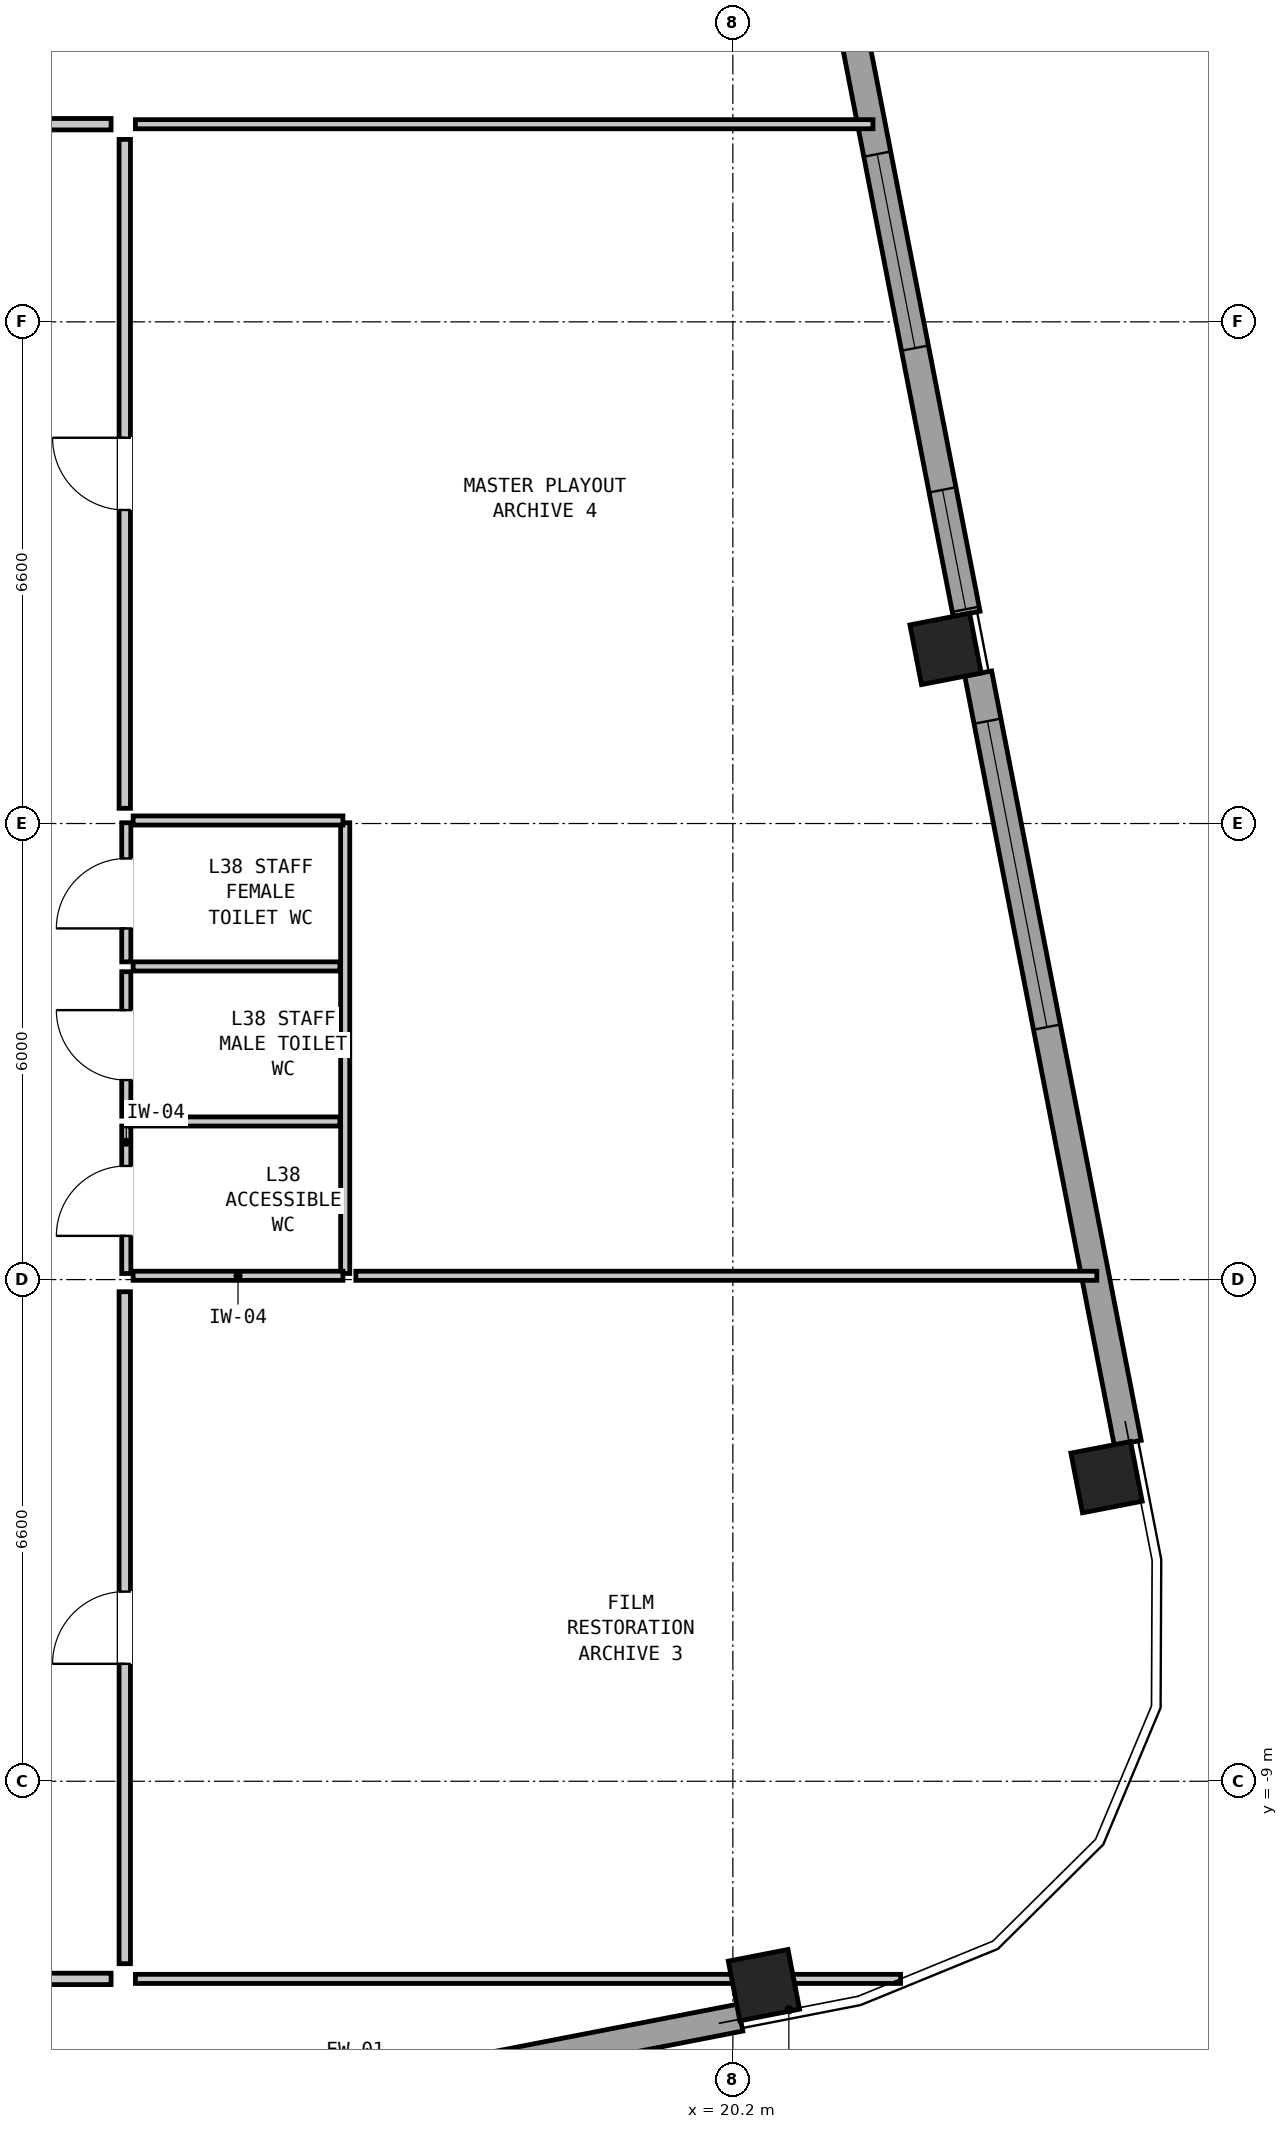
"""IFC4 building model, lengths in metres.
Left out: names, types, materials, properties, quantities, classifications, styles, units other than length and angle.
Written with IfcOpenShell. Run it as: python <this file> out.ifc"""

import sys

from ifc_helpers import new_model, si_unit, direction, frame, frame_2d, origin, origin_2d, place, context, subcontext, project, spatial, rectangle, hollow_rectangle, extrude, element, fill, save


model = new_model("IFC4")
c1 = context("Model", 3, precision=1e-05, world=origin(), true_north=direction((0.0, 1.0)))
c2 = subcontext(c1, "Body", "Model", "MODEL_VIEW")
j1 = project(units=[si_unit("LENGTHUNIT", "METRE"), si_unit("PLANEANGLEUNIT", "RADIAN")], contexts=[c1])
p1 = place(None, origin())
s1 = spatial("IfcSite", under=j1, at=p1, CompositionType="ELEMENT")
p2 = place(p1, origin())
s2 = spatial("IfcBuilding", under=s1, at=p2, CompositionType="ELEMENT")
p3 = place(p2, frame((0.0, 0.0, 131.1)))
s3 = spatial("IfcBuildingStorey", under=s2, at=p3, CompositionType="ELEMENT", Elevation=131.1)
for number, where, z_axis, x_axis in (
    (1, (20.609, -11.682, 0.0), (0.0, 0.0, 1.0), (0.982, 0.191, 0.0)),
    (2, (25.116, -5.0, 0.0), (0.0, 0.0, 1.0), (-0.191, 0.982, 0.0)),
    (3, (22.998, 5.896, 0.0), (0.0, 0.0, 1.0), (-0.191, 0.982, 0.0)),
):
    element("IfcColumn", number, at=place(p3, frame(where, z_axis=z_axis, x_axis=x_axis)), inside=s3, PredefinedType="COLUMN", context=c2, shape_type="SweptSolid", body=[
        extrude(hollow_rectangle(XDim=0.8, YDim=0.8, WallThickness=0.05, at=origin_2d()), origin(), (0.0, 0.0, 1.0), 3.05),
    ])
p4 = place(p3, frame((20.296, -12.11, 0.0), z_axis=(0.0, 0.0, 1.0), x_axis=(-0.981628941133, -0.190799952646, 0.0)))
e4 = element("IfcWall", 4, at=p4, inside=s3, PredefinedType="SOLIDWALL", context=c2, shape_type="SweptSolid", body=[
    extrude(rectangle(XDim=10.312, YDim=0.36, at=frame_2d((5.156, 0.0))), origin(), (0.0, 0.0, 1.0), 2.067),
])
p5 = place(p4, frame((5.8, 0.0, 0.2)))
e5 = element("IfcOpeningElement", 5, at=p5, cuts=e4, PredefinedType="OPENING", context=c2, shape_type="SweptSolid", body=[
    extrude(rectangle(XDim=3.7, YDim=1.1, at=frame_2d((1.85, 0.55))), frame((0.0, 0.192, 0.0), z_axis=(0.0, -1.0, 0.0), x_axis=(1.0, 0.0, 0.0)), (0.0, 0.0, 1.0), 0.384),
])
p6 = place(p3, frame((21.31, 16.469, 0.0), z_axis=(0.0, 0.0, 1.0), x_axis=(0.190811924826, -0.981626614016, 0.0)))
e6 = element("IfcWall", 6, at=p6, inside=s3, PredefinedType="SOLIDWALL", context=c2, shape_type="SweptSolid", body=[
    extrude(rectangle(XDim=10.3, YDim=0.36, at=frame_2d((5.15, 0.0))), origin(), (0.0, 0.0, 1.0), 2.067),
])
p7 = place(p6, frame((0.038, 0.0, 1.15)))
e7 = element("IfcOpeningElement", 7, at=p7, cuts=e6, PredefinedType="OPENING", context=c2, shape_type="SweptSolid", body=[
    extrude(rectangle(XDim=1.65, YDim=0.75, at=frame_2d((0.825, 0.375))), frame((0.0, 0.192, 0.0), z_axis=(0.0, -1.0, 0.0), x_axis=(1.0, 0.0, 0.0)), (0.0, 0.0, 1.0), 0.384),
])
p8 = place(p6, frame((4.138, 0.0, 0.2)))
e8 = element("IfcOpeningElement", 8, at=p8, cuts=e6, PredefinedType="OPENING", context=c2, shape_type="SweptSolid", body=[
    extrude(rectangle(XDim=2.6, YDim=1.3, at=frame_2d((1.3, 0.65))), frame((0.0, 0.192, 0.0), z_axis=(0.0, -1.0, 0.0), x_axis=(1.0, 0.0, 0.0)), (0.0, 0.0, 1.0), 0.384),
])
p9 = place(p6, frame((8.638, 0.0, 1.15)))
e9 = element("IfcOpeningElement", 9, at=p9, cuts=e6, PredefinedType="OPENING", context=c2, shape_type="SweptSolid", body=[
    extrude(rectangle(XDim=1.6, YDim=0.75, at=frame_2d((0.8, 0.375))), frame((0.0, 0.192, 0.0), z_axis=(0.0, -1.0, 0.0), x_axis=(1.0, 0.0, 0.0)), (0.0, 0.0, 1.0), 0.384),
])
p10 = place(p3, frame((23.428, 5.573, 0.0), z_axis=(0.0, 0.0, 1.0), x_axis=(0.190827200853, -0.981623644486, 0.0)))
e10 = element("IfcWall", 10, at=p10, inside=s3, PredefinedType="SOLIDWALL", context=c2, shape_type="SweptSolid", body=[
    extrude(rectangle(XDim=10.312, YDim=0.36, at=frame_2d((5.156, 0.0))), origin(), (0.0, 0.0, 1.0), 2.067),
])
p11 = place(p10, frame((0.638, 0.0, 0.2)))
e11 = element("IfcOpeningElement", 11, at=p11, cuts=e10, PredefinedType="OPENING", context=c2, shape_type="SweptSolid", body=[
    extrude(rectangle(XDim=4.1, YDim=1.05, at=frame_2d((2.05, 0.525))), frame((0.0, 0.192, 0.0), z_axis=(0.0, -1.0, 0.0), x_axis=(1.0, 0.0, 0.0)), (0.0, 0.0, 1.0), 0.384),
])
p12 = place(p3, frame((12.22, -2.32, 0.0), z_axis=(0.0, 0.0, 1.0), x_axis=(0.0, 1.0, 0.0)))
e12 = element("IfcWall", 12, at=p12, inside=s3, PredefinedType="PARTITIONING", context=c2, shape_type="SweptSolid", body=[
    extrude(rectangle(XDim=1.94, YDim=0.12, at=frame_2d((0.97, 0.0))), origin(), (0.0, 0.0, 1.0), 2.83),
])
p13 = place(p12, frame((0.495, 0.0, 0.0)))
e13 = element("IfcOpeningElement", 13, at=p13, cuts=e12, PredefinedType="OPENING", context=c2, shape_type="SweptSolid", body=[
    extrude(rectangle(XDim=0.92, YDim=2.1, at=frame_2d((0.46, 1.05))), frame((0.0, 0.072, 0.0), z_axis=(0.0, -1.0, 0.0), x_axis=(1.0, 0.0, 0.0)), (0.0, 0.0, 1.0), 0.144),
])
p14 = place(p3, frame((12.22, -0.25, 0.0), z_axis=(0.0, 0.0, 1.0), x_axis=(0.0, 1.0, 0.0)))
e14 = element("IfcWall", 14, at=p14, inside=s3, PredefinedType="PARTITIONING", context=c2, shape_type="SweptSolid", body=[
    extrude(rectangle(XDim=1.9, YDim=0.12, at=frame_2d((0.95, 0.0))), origin(), (0.0, 0.0, 1.0), 2.83),
])
p15 = place(p14, frame((0.475, 0.0, 0.0)))
e15 = element("IfcOpeningElement", 15, at=p15, cuts=e14, PredefinedType="OPENING", context=c2, shape_type="SweptSolid", body=[
    extrude(rectangle(XDim=0.92, YDim=2.1, at=frame_2d((0.46, 1.05))), frame((0.0, 0.072, 0.0), z_axis=(0.0, -1.0, 0.0), x_axis=(1.0, 0.0, 0.0)), (0.0, 0.0, 1.0), 0.144),
])
p16 = place(p3, frame((12.22, 1.78, 0.0), z_axis=(0.0, 0.0, 1.0), x_axis=(0.0, 1.0, 0.0)))
e16 = element("IfcWall", 16, at=p16, inside=s3, PredefinedType="PARTITIONING", context=c2, shape_type="SweptSolid", body=[
    extrude(rectangle(XDim=1.83, YDim=0.12, at=frame_2d((0.915, 0.0))), origin(), (0.0, 0.0, 1.0), 2.83),
])
p17 = place(p16, frame((0.44, 0.0, 0.0)))
e17 = element("IfcOpeningElement", 17, at=p17, cuts=e16, PredefinedType="OPENING", context=c2, shape_type="SweptSolid", body=[
    extrude(rectangle(XDim=0.92, YDim=2.1, at=frame_2d((0.46, 1.05))), frame((0.0, 0.072, 0.0), z_axis=(0.0, -1.0, 0.0), x_axis=(1.0, 0.0, 0.0)), (0.0, 0.0, 1.0), 0.144),
])
p18 = place(p3, frame((15.1, -2.32, 0.0), z_axis=(0.0, 0.0, 1.0), x_axis=(0.0, 1.0, 0.0)))
e18 = element("IfcWall", 18, at=p18, inside=s3, PredefinedType="PARTITIONING", context=c2, shape_type="SweptSolid", body=[
    extrude(rectangle(XDim=5.93, YDim=0.12, at=frame_2d((2.965, 0.0))), origin(), (0.0, 0.0, 1.0), 2.83),
])
for number, where, z_axis, x_axis in (
    (19, (12.31, -2.35, 0.0), (0.0, 0.0, 1.0), (1.0, 0.0, 0.0)),
    (20, (12.31, 3.64, 0.0), (0.0, 0.0, 1.0), (1.0, 0.0, 0.0)),
):
    element("IfcWall", number, at=place(p3, frame(where, z_axis=z_axis, x_axis=x_axis)), inside=s3, PredefinedType="PARTITIONING", context=c2, shape_type="SweptSolid", body=[
        extrude(rectangle(XDim=2.76, YDim=0.12, at=frame_2d((1.38, 0.0))), origin(), (0.0, 0.0, 1.0), 1.883),
    ])
for number, where, z_axis, x_axis in (
    (21, (12.31, -0.32, 0.0), (0.0, 0.0, 1.0), (1.0, 0.0, 0.0)),
    (22, (12.31, 1.72, 0.0), (0.0, 0.0, 1.0), (1.0, 0.0, 0.0)),
):
    element("IfcWall", number, at=place(p3, frame(where, z_axis=z_axis, x_axis=x_axis)), inside=s3, PredefinedType="PARTITIONING", context=c2, shape_type="SweptSolid", body=[
        extrude(rectangle(XDim=2.72, YDim=0.12, at=frame_2d((1.36, 0.0))), origin(), (0.0, 0.0, 1.0), 2.83),
    ])
p19 = place(p3, frame((12.34, 12.8, 0.0), z_axis=(0.0, 0.0, 1.0), x_axis=(1.0, 0.0, 0.0)))
e23 = element("IfcWall", 23, at=p19, inside=s3, PredefinedType="PARTITIONING", context=c2, shape_type="SweptSolid", body=[
    extrude(rectangle(XDim=9.703, YDim=0.12, at=frame_2d((4.852, 0.0))), origin(), (0.0, 0.0, 1.0), 2.83),
])
p20 = place(p3, frame((12.34, -11.6, 0.0), z_axis=(0.0, 0.0, 1.0), x_axis=(1.0, 0.0, 0.0)))
e24 = element("IfcWall", 24, at=p20, inside=s3, PredefinedType="PARTITIONING", context=c2, shape_type="SweptSolid", body=[
    extrude(rectangle(XDim=10.066, YDim=0.12, at=frame_2d((5.033, 0.0))), origin(), (0.0, 0.0, 1.0), 2.127),
])
p21 = place(p3, frame((15.24, -2.35, 0.0), z_axis=(0.0, 0.0, 1.0), x_axis=(1.0, 0.0, 0.0)))
e25 = element("IfcWall", 25, at=p21, inside=s3, PredefinedType="PARTITIONING", context=c2, shape_type="SweptSolid", body=[
    extrude(rectangle(XDim=9.748, YDim=0.12, at=frame_2d((4.874, 0.0))), origin(), (0.0, 0.0, 1.0), 1.883),
])
p22 = place(p3, frame((6.68, 12.8, 0.0), z_axis=(0.0, 0.0, 1.0), x_axis=(1.0, 0.0, 0.0)))
e26 = element("IfcWall", 26, at=p22, inside=s3, PredefinedType="PARTITIONING", context=c2, shape_type="SweptSolid", body=[
    extrude(rectangle(XDim=5.34, YDim=0.15, at=frame_2d((2.67, 0.0))), origin(), (0.0, 0.0, 1.0), 2.83),
])
p23 = place(p22, frame((1.395, 0.0, 0.0)))
e27 = element("IfcOpeningElement", 27, at=p23, cuts=e26, PredefinedType="OPENING", context=c2, shape_type="SweptSolid", body=[
    extrude(rectangle(XDim=0.95, YDim=2.1, at=frame_2d((0.475, 1.05))), frame((0.0, 0.087, 0.0), z_axis=(0.0, -1.0, 0.0), x_axis=(1.0, 0.0, 0.0)), (0.0, 0.0, 1.0), 0.174),
])
p24 = place(p3, frame((7.68, -11.6, 0.0), z_axis=(0.0, 0.0, 1.0), x_axis=(1.0, 0.0, 0.0)))
e28 = element("IfcWall", 28, at=p24, inside=s3, PredefinedType="PARTITIONING", context=c2, shape_type="SweptSolid", body=[
    extrude(rectangle(XDim=4.34, YDim=0.15, at=frame_2d((2.17, 0.0))), origin(), (0.0, 0.0, 1.0), 2.347),
])
p25 = place(p24, frame((2.095, 0.0, 0.0)))
e29 = element("IfcOpeningElement", 29, at=p25, cuts=e28, PredefinedType="OPENING", context=c2, shape_type="SweptSolid", body=[
    extrude(rectangle(XDim=0.95, YDim=2.1, at=frame_2d((0.475, 1.05))), frame((0.0, 0.087, 0.0), z_axis=(0.0, -1.0, 0.0), x_axis=(1.0, 0.0, 0.0)), (0.0, 0.0, 1.0), 0.174),
])
p26 = place(p3, frame((12.2, -11.4, 0.0), z_axis=(0.0, 0.0, 1.0), x_axis=(0.0, 1.0, 0.0)))
e30 = element("IfcWall", 30, at=p26, inside=s3, PredefinedType="PARTITIONING", context=c2, shape_type="SweptSolid", body=[
    extrude(rectangle(XDim=8.84, YDim=0.15, at=frame_2d((4.42, 0.0))), origin(), (0.0, 0.0, 1.0), 2.83),
])
p27 = place(p26, frame((3.945, 0.0, 0.0)))
e31 = element("IfcOpeningElement", 31, at=p27, cuts=e30, PredefinedType="OPENING", context=c2, shape_type="SweptSolid", body=[
    extrude(rectangle(XDim=0.95, YDim=2.1, at=frame_2d((0.475, 1.05))), frame((0.0, 0.087, 0.0), z_axis=(0.0, -1.0, 0.0), x_axis=(1.0, 0.0, 0.0)), (0.0, 0.0, 1.0), 0.174),
])
p28 = place(p3, frame((12.2, 3.8, 0.0), z_axis=(0.0, 0.0, 1.0), x_axis=(0.0, 1.0, 0.0)))
e32 = element("IfcWall", 32, at=p28, inside=s3, PredefinedType="PARTITIONING", context=c2, shape_type="SweptSolid", body=[
    extrude(rectangle(XDim=8.8, YDim=0.15, at=frame_2d((4.4, 0.0))), origin(), (0.0, 0.0, 1.0), 2.83),
])
p29 = place(p28, frame((3.925, 0.0, 0.0)))
e33 = element("IfcOpeningElement", 33, at=p29, cuts=e32, PredefinedType="OPENING", context=c2, shape_type="SweptSolid", body=[
    extrude(rectangle(XDim=0.95, YDim=2.1, at=frame_2d((0.475, 1.05))), frame((0.0, 0.087, 0.0), z_axis=(0.0, -1.0, 0.0), x_axis=(1.0, 0.0, 0.0)), (0.0, 0.0, 1.0), 0.174),
])
p30 = place(p8, origin())
e34 = element("IfcWindow", 34, at=p30, inside=s3, PartitioningType="SINGLE_PANEL", PredefinedType="WINDOW", context=c2, shape_type="SweptSolid", body=[
    extrude(rectangle(XDim=2.6, YDim=1.3, at=frame_2d((1.3, 0.65))), frame((0.0, 0.03, 0.0), z_axis=(0.0, -1.0, 0.0), x_axis=(1.0, 0.0, 0.0)), (0.0, 0.0, 1.0), 0.06),
])
fill(e8, e34)
p31 = place(p9, origin())
e35 = element("IfcWindow", 35, at=p31, inside=s3, PartitioningType="SINGLE_PANEL", PredefinedType="WINDOW", context=c2, shape_type="SweptSolid", body=[
    extrude(rectangle(XDim=1.6, YDim=0.75, at=frame_2d((0.8, 0.375))), frame((0.0, 0.03, 0.0), z_axis=(0.0, -1.0, 0.0), x_axis=(1.0, 0.0, 0.0)), (0.0, 0.0, 1.0), 0.06),
])
fill(e9, e35)
p32 = place(p11, origin())
e36 = element("IfcWindow", 36, at=p32, inside=s3, PartitioningType="SINGLE_PANEL", PredefinedType="WINDOW", context=c2, shape_type="SweptSolid", body=[
    extrude(rectangle(XDim=4.1, YDim=1.05, at=frame_2d((2.05, 0.525))), frame((0.0, 0.03, 0.0), z_axis=(0.0, -1.0, 0.0), x_axis=(1.0, 0.0, 0.0)), (0.0, 0.0, 1.0), 0.06),
])
fill(e11, e36)
p33 = place(p13, origin())
e37 = element("IfcDoor", 37, at=p33, inside=s3, OperationType="SINGLE_SWING_LEFT", PredefinedType="DOOR", context=c2, shape_type="SweptSolid", body=[
    extrude(rectangle(XDim=0.92, YDim=2.1, at=frame_2d((0.46, 1.05))), frame((0.0, 0.025, 0.0), z_axis=(0.0, -1.0, 0.0), x_axis=(1.0, 0.0, 0.0)), (0.0, 0.0, 1.0), 0.05),
])
fill(e13, e37)
p34 = place(p15, origin())
e38 = element("IfcDoor", 38, at=p34, inside=s3, OperationType="SINGLE_SWING_RIGHT", PredefinedType="DOOR", context=c2, shape_type="SweptSolid", body=[
    extrude(rectangle(XDim=0.92, YDim=2.1, at=frame_2d((0.46, 1.05))), frame((0.0, 0.025, 0.0), z_axis=(0.0, -1.0, 0.0), x_axis=(1.0, 0.0, 0.0)), (0.0, 0.0, 1.0), 0.05),
])
fill(e15, e38)
p35 = place(p17, origin())
e39 = element("IfcDoor", 39, at=p35, inside=s3, OperationType="SINGLE_SWING_LEFT", PredefinedType="DOOR", context=c2, shape_type="SweptSolid", body=[
    extrude(rectangle(XDim=0.92, YDim=2.1, at=frame_2d((0.46, 1.05))), frame((0.0, 0.025, 0.0), z_axis=(0.0, -1.0, 0.0), x_axis=(1.0, 0.0, 0.0)), (0.0, 0.0, 1.0), 0.05),
])
fill(e17, e39)
p36 = place(p27, origin())
e40 = element("IfcDoor", 40, at=p36, inside=s3, OperationType="SINGLE_SWING_LEFT", PredefinedType="DOOR", context=c2, shape_type="SweptSolid", body=[
    extrude(rectangle(XDim=0.95, YDim=2.1, at=frame_2d((0.475, 1.05))), frame((0.0, 0.025, 0.0), z_axis=(0.0, -1.0, 0.0), x_axis=(1.0, 0.0, 0.0)), (0.0, 0.0, 1.0), 0.05),
])
fill(e31, e40)
p37 = place(p29, origin())
e41 = element("IfcDoor", 41, at=p37, inside=s3, OperationType="SINGLE_SWING_RIGHT", PredefinedType="DOOR", context=c2, shape_type="SweptSolid", body=[
    extrude(rectangle(XDim=0.95, YDim=2.1, at=frame_2d((0.475, 1.05))), frame((0.0, 0.025, 0.0), z_axis=(0.0, -1.0, 0.0), x_axis=(1.0, 0.0, 0.0)), (0.0, 0.0, 1.0), 0.05),
])
fill(e33, e41)
save(model, sys.argv[1])
